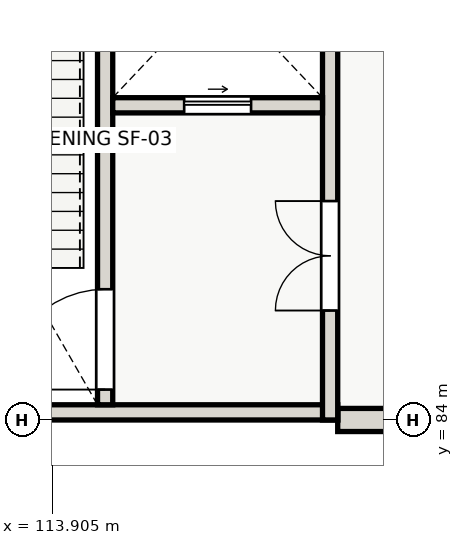
"""IFC4 building model, lengths in metres.
Left out: names, types, materials, properties, quantities, classifications, styles, units other than length and angle.
Written with IfcOpenShell. Run it as: python <this file> out.ifc"""

import sys

from ifc_helpers import new_model, si_unit, direction, frame, frame_2d, origin, place, context, subcontext, project, spatial, rectangle, extrude, element, fill, save


model = new_model("IFC4")
c1 = context("Model", 3, precision=1e-05, world=origin(), true_north=direction((0.0, 1.0)))
c2 = subcontext(c1, "Body", "Model", "MODEL_VIEW")
j1 = project(units=[si_unit("LENGTHUNIT", "METRE"), si_unit("PLANEANGLEUNIT", "RADIAN")], contexts=[c1])
p1 = place(None, origin())
s1 = spatial("IfcSite", under=j1, at=p1, CompositionType="ELEMENT")
p2 = place(p1, origin())
s2 = spatial("IfcBuilding", under=s1, at=p2, CompositionType="ELEMENT")
p3 = place(p2, frame((0.0, 0.0, 4.2)))
s3 = spatial("IfcBuildingStorey", under=s2, at=p3, CompositionType="ELEMENT", Elevation=4.2)
p4 = place(p3, frame((120.0, 84.0, 0.0), z_axis=(0.0, 0.0, 1.0), x_axis=(-1.0, 0.0, 0.0)))
e1 = element("IfcWall", 1, at=p4, inside=s3, PredefinedType="SOLIDWALL", context=c2, shape_type="SweptSolid", body=[
    extrude(rectangle(XDim=1.4, YDim=0.38, at=frame_2d((0.7, 0.0))), origin(), (0.0, 0.0, 1.0), 3.53),
])
p5 = place(p3, frame((118.6, 84.125, 0.0), z_axis=(0.0, 0.0, 1.0), x_axis=(-1.0, 0.0, 0.0)))
e2 = element("IfcWall", 2, at=p5, inside=s3, PredefinedType="SHEAR", context=c2, shape_type="SweptSolid", body=[
    extrude(rectangle(XDim=9.2, YDim=0.25, at=frame_2d((4.6, 0.0))), origin(), (0.0, 0.0, 1.0), 4.2),
])
p6 = place(p3, frame((118.475, 84.0, 0.0), z_axis=(0.0, 0.0, 1.0), x_axis=(0.0, 1.0, 0.0)))
e3 = element("IfcWall", 3, at=p6, inside=s3, PredefinedType="SHEAR", context=c2, shape_type="SweptSolid", body=[
    extrude(rectangle(XDim=9.2, YDim=0.25, at=frame_2d((4.6, 0.0))), origin(), (0.0, 0.0, 1.0), 4.2),
])
p7 = place(p6, frame((1.8, 0.0, 0.0)))
e4 = element("IfcOpeningElement", 4, at=p7, cuts=e3, PredefinedType="OPENING", context=c2, shape_type="SweptSolid", body=[
    extrude(rectangle(XDim=1.8, YDim=2.15, at=frame_2d((0.9, 1.075))), frame((0.0, 0.135, 0.0), z_axis=(0.0, -1.0, 0.0), x_axis=(1.0, 0.0, 0.0)), (0.0, 0.0, 1.0), 0.27),
])
p8 = place(p3, frame((114.775, 84.25, 0.0), z_axis=(0.0, 0.0, 1.0), x_axis=(0.0, 1.0, 0.0)))
e5 = element("IfcWall", 5, at=p8, inside=s3, PredefinedType="SHEAR", context=c2, shape_type="SweptSolid", body=[
    extrude(rectangle(XDim=8.7, YDim=0.25, at=frame_2d((4.35, 0.0))), origin(), (0.0, 0.0, 1.0), 4.2),
])
p9 = place(p8, frame((0.25, 0.0, 0.0)))
e6 = element("IfcOpeningElement", 6, at=p9, cuts=e5, PredefinedType="OPENING", context=c2, shape_type="SweptSolid", body=[
    extrude(rectangle(XDim=1.65, YDim=2.1, at=frame_2d((0.825, 1.05))), frame((0.0, 0.135, 0.0), z_axis=(0.0, -1.0, 0.0), x_axis=(1.0, 0.0, 0.0)), (0.0, 0.0, 1.0), 0.27),
])
p10 = place(p3, frame((114.9, 89.175, 0.0), z_axis=(0.0, 0.0, 1.0), x_axis=(1.0, 0.0, 0.0)))
e7 = element("IfcWall", 7, at=p10, inside=s3, PredefinedType="SHEAR", context=c2, shape_type="SweptSolid", body=[
    extrude(rectangle(XDim=3.45, YDim=0.25, at=frame_2d((1.725, 0.0))), origin(), (0.0, 0.0, 1.0), 4.2),
])
p11 = place(p10, frame((1.175, 0.0, 0.0)))
e8 = element("IfcOpeningElement", 8, at=p11, cuts=e7, PredefinedType="OPENING", context=c2, shape_type="SweptSolid", body=[
    extrude(rectangle(XDim=1.1, YDim=2.1, at=frame_2d((0.55, 1.05))), frame((0.0, 0.135, 0.0), z_axis=(0.0, -1.0, 0.0), x_axis=(1.0, 0.0, 0.0)), (0.0, 0.0, 1.0), 0.27),
])
p12 = place(p7, origin())
e9 = element("IfcDoor", 9, at=p12, inside=s3, OperationType="DOUBLE_DOOR_SINGLE_SWING", PredefinedType="DOOR", context=c2, shape_type="SweptSolid", body=[
    extrude(rectangle(XDim=1.8, YDim=2.15, at=frame_2d((0.9, 1.075))), frame((0.0, 0.025, 0.0), z_axis=(0.0, -1.0, 0.0), x_axis=(1.0, 0.0, 0.0)), (0.0, 0.0, 1.0), 0.05),
])
fill(e4, e9)
p13 = place(p9, origin())
e10 = element("IfcDoor", 10, at=p13, inside=s3, OperationType="SINGLE_SWING_LEFT", PredefinedType="DOOR", context=c2, shape_type="SweptSolid", body=[
    extrude(rectangle(XDim=1.65, YDim=2.1, at=frame_2d((0.825, 1.05))), frame((0.0, 0.025, 0.0), z_axis=(0.0, -1.0, 0.0), x_axis=(1.0, 0.0, 0.0)), (0.0, 0.0, 1.0), 0.05),
])
fill(e6, e10)
p14 = place(p11, origin())
e11 = element("IfcDoor", 11, at=p14, inside=s3, OperationType="SLIDING_TO_RIGHT", PredefinedType="DOOR", context=c2, shape_type="SweptSolid", body=[
    extrude(rectangle(XDim=1.1, YDim=2.1, at=frame_2d((0.55, 1.05))), frame((0.0, 0.025, 0.0), z_axis=(0.0, -1.0, 0.0), x_axis=(1.0, 0.0, 0.0)), (0.0, 0.0, 1.0), 0.05),
])
fill(e8, e11)
save(model, sys.argv[1])
